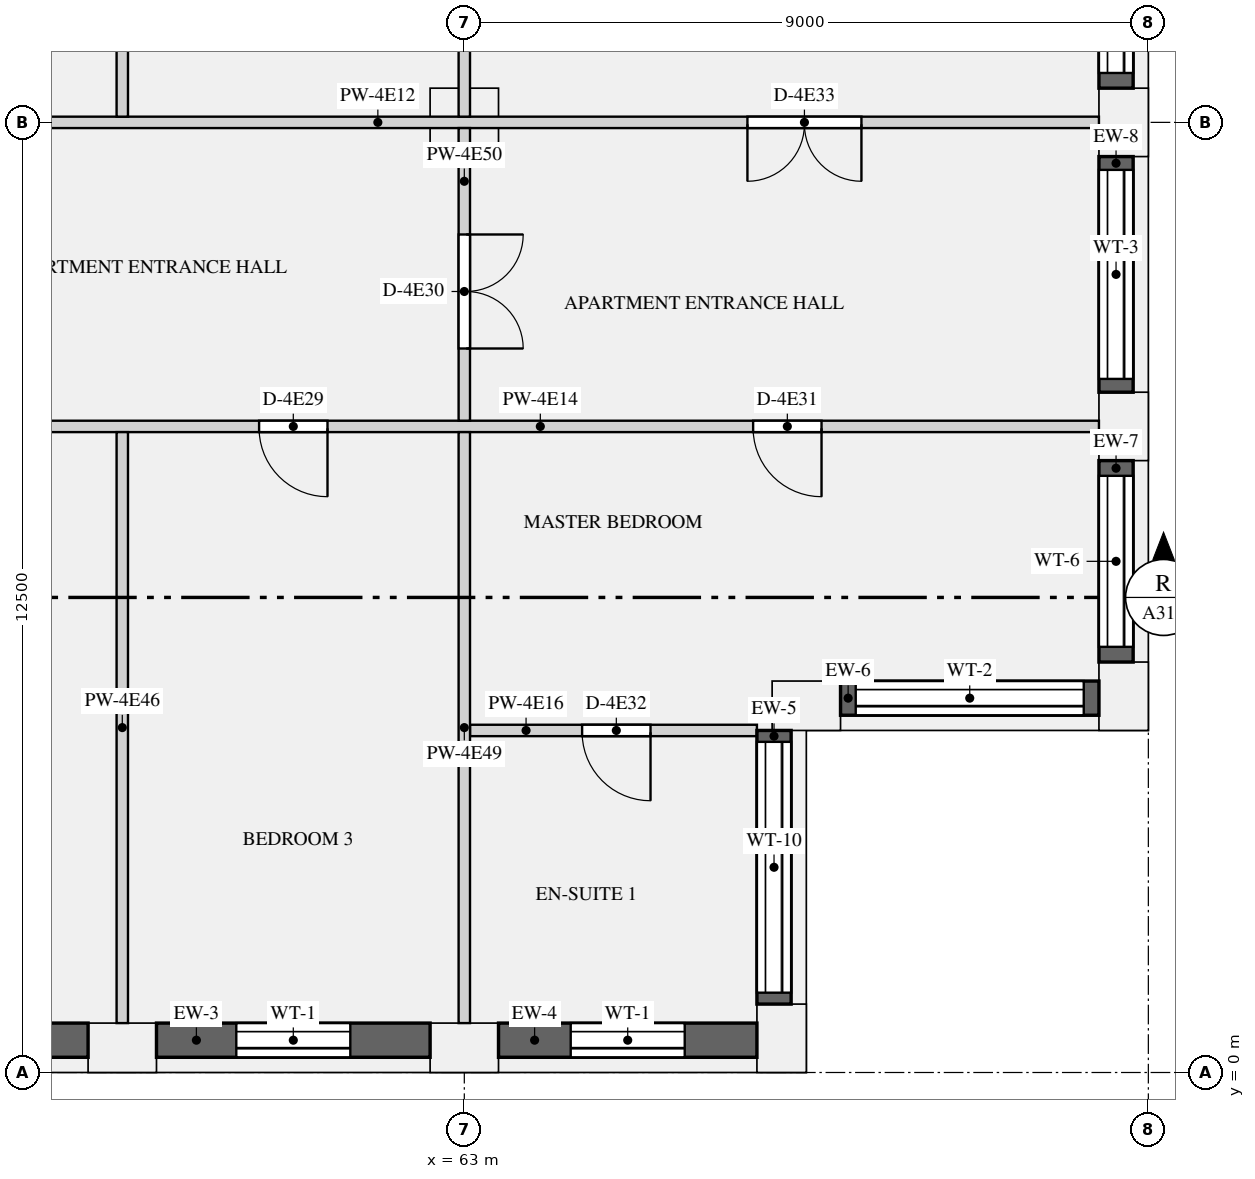
"""IFC4 building model, lengths in metres.
Left out: names, types, materials, properties, quantities, classifications, styles, units other than length and angle.
Written with IfcOpenShell. Run it as: python <this file> out.ifc"""

import sys

from ifc_helpers import new_model, si_unit, direction, frame, frame_2d, origin, origin_2d, place, context, subcontext, project, spatial, rectangle, extrude, element, fill, save


model = new_model("IFC4")
c1 = context("Model", 3, precision=1e-05, world=origin(), true_north=direction((0.0, 1.0)))
c2 = subcontext(c1, "Body", "Model", "MODEL_VIEW")
j1 = project(units=[si_unit("LENGTHUNIT", "METRE"), si_unit("PLANEANGLEUNIT", "RADIAN")], contexts=[c1])
p1 = place(None, origin())
s1 = spatial("IfcSite", under=j1, at=p1, CompositionType="ELEMENT")
p2 = place(p1, origin())
s2 = spatial("IfcBuilding", under=s1, at=p2, CompositionType="ELEMENT")
p3 = place(p2, frame((0.0, 0.0, 232.65)))
s3 = spatial("IfcBuildingStorey", under=s2, at=p3, CompositionType="ELEMENT", Elevation=232.65)
for number, where, z_axis, x_axis in (
    (1, (58.5, 0.325, 0.0), (0.0, 0.0, 1.0), (1.0, 0.0, 0.0)),
    (2, (63.0, 0.325, 0.0), (0.0, 0.0, 1.0), (1.0, 0.0, 0.0)),
    (3, (67.175, 0.45, 0.0), (0.0, 0.0, 1.0), (0.0, 1.0, 0.0)),
    (4, (67.5, 4.825, 0.0), (0.0, 0.0, 1.0), (1.0, 0.0, 0.0)),
    (5, (71.675, 4.95, 0.0), (0.0, 0.0, 1.0), (0.0, 1.0, 0.0)),
    (6, (71.675, 8.5, 0.0), (0.0, 0.0, 1.0), (0.0, 1.0, 0.0)),
    (7, (71.675, 12.5, 0.0), (0.0, 0.0, 1.0), (0.0, 1.0, 0.0)),
):
    element("IfcColumn", number, at=place(p3, frame(where, z_axis=z_axis, x_axis=x_axis)), inside=s3, PredefinedType="USERDEFINED", context=c2, shape_type="SweptSolid", body=[
        extrude(rectangle(XDim=0.9, YDim=0.65, at=origin_2d()), origin(), (0.0, 0.0, 1.0), 3.15),
    ])
p4 = place(p3, frame((63.0, 12.5, 0.0), z_axis=(0.0, 0.0, 1.0), x_axis=(1.0, 0.0, 0.0)))
e8 = element("IfcColumn", 8, at=p4, inside=s3, PredefinedType="COLUMN", context=c2, shape_type="SweptSolid", body=[
    extrude(rectangle(XDim=0.9, YDim=0.9, at=origin_2d()), origin(), (0.0, 0.0, 1.0), 3.15),
])
p5 = place(p3, frame((54.0, 0.425, 0.9), z_axis=(0.0, 0.0, 1.0), x_axis=(1.0, 0.0, 0.0)))
e9 = element("IfcWall", 9, at=p5, inside=s3, PredefinedType="SOLIDWALL", context=c2, shape_type="SweptSolid", body=[
    extrude(rectangle(XDim=4.05, YDim=0.45, at=frame_2d((2.025, 0.0))), origin(), (0.0, 0.0, 1.0), 1.9),
])
p6 = place(p5, frame((1.275, 0.0, 0.15)))
e10 = element("IfcOpeningElement", 10, at=p6, cuts=e9, PredefinedType="OPENING", context=c2, shape_type="SweptSolid", body=[
    extrude(rectangle(XDim=1.5, YDim=1.5, at=frame_2d((0.75, 0.75))), frame((0.0, 0.235, 0.0), z_axis=(0.0, -1.0, 0.0), x_axis=(1.0, 0.0, 0.0)), (0.0, 0.0, 1.0), 0.47),
])
p7 = place(p3, frame((58.95, 0.425, 0.9), z_axis=(0.0, 0.0, 1.0), x_axis=(1.0, 0.0, 0.0)))
e11 = element("IfcWall", 11, at=p7, inside=s3, PredefinedType="SOLIDWALL", context=c2, shape_type="SweptSolid", body=[
    extrude(rectangle(XDim=3.6, YDim=0.45, at=frame_2d((1.8, 0.0))), origin(), (0.0, 0.0, 1.0), 1.9),
])
p8 = place(p7, frame((1.05, 0.0, 0.15)))
e12 = element("IfcOpeningElement", 12, at=p8, cuts=e11, PredefinedType="OPENING", context=c2, shape_type="SweptSolid", body=[
    extrude(rectangle(XDim=1.5, YDim=1.5, at=frame_2d((0.75, 0.75))), frame((0.0, 0.235, 0.0), z_axis=(0.0, -1.0, 0.0), x_axis=(1.0, 0.0, 0.0)), (0.0, 0.0, 1.0), 0.47),
])
p9 = place(p3, frame((63.45, 0.425, 0.9), z_axis=(0.0, 0.0, 1.0), x_axis=(1.0, 0.0, 0.0)))
e13 = element("IfcWall", 13, at=p9, inside=s3, PredefinedType="SOLIDWALL", context=c2, shape_type="SweptSolid", body=[
    extrude(rectangle(XDim=3.4, YDim=0.45, at=frame_2d((1.7, 0.0))), origin(), (0.0, 0.0, 1.0), 1.9),
])
p10 = place(p9, frame((0.95, 0.0, 0.15)))
e14 = element("IfcOpeningElement", 14, at=p10, cuts=e13, PredefinedType="OPENING", context=c2, shape_type="SweptSolid", body=[
    extrude(rectangle(XDim=1.5, YDim=1.5, at=frame_2d((0.75, 0.75))), frame((0.0, 0.235, 0.0), z_axis=(0.0, -1.0, 0.0), x_axis=(1.0, 0.0, 0.0)), (0.0, 0.0, 1.0), 0.47),
])
p11 = place(p3, frame((67.075, 0.9, 0.9), z_axis=(0.0, 0.0, 1.0), x_axis=(0.0, 1.0, 0.0)))
e15 = element("IfcWall", 15, at=p11, inside=s3, PredefinedType="SOLIDWALL", context=c2, shape_type="SweptSolid", body=[
    extrude(rectangle(XDim=3.6, YDim=0.45, at=frame_2d((1.8, 0.0))), origin(), (0.0, 0.0, 1.0), 1.9),
])
p12 = place(p11, frame((0.15, 0.0, 0.15)))
e16 = element("IfcOpeningElement", 16, at=p12, cuts=e15, PredefinedType="OPENING", context=c2, shape_type="SweptSolid", body=[
    extrude(rectangle(XDim=3.3, YDim=1.5, at=frame_2d((1.65, 0.75))), frame((0.0, 0.235, 0.0), z_axis=(0.0, -1.0, 0.0), x_axis=(1.0, 0.0, 0.0)), (0.0, 0.0, 1.0), 0.47),
])
p13 = place(p3, frame((67.95, 4.925, 0.9), z_axis=(0.0, 0.0, 1.0), x_axis=(1.0, 0.0, 0.0)))
e17 = element("IfcWall", 17, at=p13, inside=s3, PredefinedType="SOLIDWALL", context=c2, shape_type="SweptSolid", body=[
    extrude(rectangle(XDim=3.4, YDim=0.45, at=frame_2d((1.7, 0.0))), origin(), (0.0, 0.0, 1.0), 1.9),
])
p14 = place(p13, frame((0.2, 0.0, 0.15)))
e18 = element("IfcOpeningElement", 18, at=p14, cuts=e17, PredefinedType="OPENING", context=c2, shape_type="SweptSolid", body=[
    extrude(rectangle(XDim=3.0, YDim=1.5, at=frame_2d((1.5, 0.75))), frame((0.0, 0.235, 0.0), z_axis=(0.0, -1.0, 0.0), x_axis=(1.0, 0.0, 0.0)), (0.0, 0.0, 1.0), 0.47),
])
p15 = place(p3, frame((71.575, 5.4, 0.9), z_axis=(0.0, 0.0, 1.0), x_axis=(0.0, 1.0, 0.0)))
e19 = element("IfcWall", 19, at=p15, inside=s3, PredefinedType="SOLIDWALL", context=c2, shape_type="SweptSolid", body=[
    extrude(rectangle(XDim=2.65, YDim=0.45, at=frame_2d((1.325, 0.0))), origin(), (0.0, 0.0, 1.0), 1.9),
])
p16 = place(p15, frame((0.2, 0.0, 0.15)))
e20 = element("IfcOpeningElement", 20, at=p16, cuts=e19, PredefinedType="OPENING", context=c2, shape_type="SweptSolid", body=[
    extrude(rectangle(XDim=2.25, YDim=1.5, at=frame_2d((1.125, 0.75))), frame((0.0, 0.235, 0.0), z_axis=(0.0, -1.0, 0.0), x_axis=(1.0, 0.0, 0.0)), (0.0, 0.0, 1.0), 0.47),
])
p17 = place(p3, frame((71.575, 8.95, 0.9), z_axis=(0.0, 0.0, 1.0), x_axis=(0.0, 1.0, 0.0)))
e21 = element("IfcWall", 21, at=p17, inside=s3, PredefinedType="SOLIDWALL", context=c2, shape_type="SweptSolid", body=[
    extrude(rectangle(XDim=3.1, YDim=0.45, at=frame_2d((1.55, 0.0))), origin(), (0.0, 0.0, 1.0), 1.9),
])
p18 = place(p17, frame((0.175, 0.0, 0.15)))
e22 = element("IfcOpeningElement", 22, at=p18, cuts=e21, PredefinedType="OPENING", context=c2, shape_type="SweptSolid", body=[
    extrude(rectangle(XDim=2.75, YDim=1.5, at=frame_2d((1.375, 0.75))), frame((0.0, 0.235, 0.0), z_axis=(0.0, -1.0, 0.0), x_axis=(1.0, 0.0, 0.0)), (0.0, 0.0, 1.0), 0.47),
])
p19 = place(p3, frame((71.575, 12.95, 0.9), z_axis=(0.0, 0.0, 1.0), x_axis=(0.0, 1.0, 0.0)))
e23 = element("IfcWall", 23, at=p19, inside=s3, PredefinedType="SOLIDWALL", context=c2, shape_type="SweptSolid", body=[
    extrude(rectangle(XDim=2.9, YDim=0.45, at=frame_2d((1.45, 0.0))), origin(), (0.0, 0.0, 1.0), 1.9),
])
p20 = place(p19, frame((0.2, 0.0, 0.15)))
e24 = element("IfcOpeningElement", 24, at=p20, cuts=e23, PredefinedType="OPENING", context=c2, shape_type="SweptSolid", body=[
    extrude(rectangle(XDim=2.5, YDim=1.5, at=frame_2d((1.25, 0.75))), frame((0.0, 0.235, 0.0), z_axis=(0.0, -1.0, 0.0), x_axis=(1.0, 0.0, 0.0)), (0.0, 0.0, 1.0), 0.47),
])
p21 = place(p3, frame((54.0, 12.5, 0.0), z_axis=(0.0, 0.0, 1.0), x_axis=(1.0, 0.0, 0.0)))
e25 = element("IfcWall", 25, at=p21, inside=s3, PredefinedType="PARTITIONING", context=c2, shape_type="SweptSolid", body=[
    extrude(rectangle(XDim=17.35, YDim=0.15, at=frame_2d((8.675, 0.0))), origin(), (0.0, 0.0, 1.0), 2.8),
])
p22 = place(p21, frame((1.5, 0.0, 0.0)))
e26 = element("IfcOpeningElement", 26, at=p22, cuts=e25, PredefinedType="OPENING", context=c2, shape_type="SweptSolid", body=[
    extrude(rectangle(XDim=1.5, YDim=2.1, at=frame_2d((0.75, 1.05))), frame((0.0, 0.085, 0.0), z_axis=(0.0, -1.0, 0.0), x_axis=(1.0, 0.0, 0.0)), (0.0, 0.0, 1.0), 0.17),
])
p23 = place(p21, frame((12.725, 0.0, 0.0)))
e27 = element("IfcOpeningElement", 27, at=p23, cuts=e25, PredefinedType="OPENING", context=c2, shape_type="SweptSolid", body=[
    extrude(rectangle(XDim=1.5, YDim=2.1, at=frame_2d((0.75, 1.05))), frame((0.0, 0.085, 0.0), z_axis=(0.0, -1.0, 0.0), x_axis=(1.0, 0.0, 0.0)), (0.0, 0.0, 1.0), 0.17),
])
p24 = place(p3, frame((54.0, 8.5, 0.0), z_axis=(0.0, 0.0, 1.0), x_axis=(1.0, 0.0, 0.0)))
e28 = element("IfcWall", 28, at=p24, inside=s3, PredefinedType="PARTITIONING", context=c2, shape_type="SweptSolid", body=[
    extrude(rectangle(XDim=17.35, YDim=0.15, at=frame_2d((8.675, 0.0))), origin(), (0.0, 0.0, 1.0), 2.8),
])
p25 = place(p24, frame((1.8, 0.0, 0.0)))
e29 = element("IfcOpeningElement", 29, at=p25, cuts=e28, PredefinedType="OPENING", context=c2, shape_type="SweptSolid", body=[
    extrude(rectangle(XDim=0.9, YDim=2.1, at=frame_2d((0.45, 1.05))), frame((0.0, 0.085, 0.0), z_axis=(0.0, -1.0, 0.0), x_axis=(1.0, 0.0, 0.0)), (0.0, 0.0, 1.0), 0.17),
])
p26 = place(p24, frame((6.3, 0.0, 0.0)))
e30 = element("IfcOpeningElement", 30, at=p26, cuts=e28, PredefinedType="OPENING", context=c2, shape_type="SweptSolid", body=[
    extrude(rectangle(XDim=0.9, YDim=2.1, at=frame_2d((0.45, 1.05))), frame((0.0, 0.085, 0.0), z_axis=(0.0, -1.0, 0.0), x_axis=(1.0, 0.0, 0.0)), (0.0, 0.0, 1.0), 0.17),
])
p27 = place(p24, frame((12.8, 0.0, 0.0)))
e31 = element("IfcOpeningElement", 31, at=p27, cuts=e28, PredefinedType="OPENING", context=c2, shape_type="SweptSolid", body=[
    extrude(rectangle(XDim=0.9, YDim=2.1, at=frame_2d((0.45, 1.05))), frame((0.0, 0.085, 0.0), z_axis=(0.0, -1.0, 0.0), x_axis=(1.0, 0.0, 0.0)), (0.0, 0.0, 1.0), 0.17),
])
p28 = place(p3, frame((63.075, 4.5, 0.0), z_axis=(0.0, 0.0, 1.0), x_axis=(1.0, 0.0, 0.0)))
e32 = element("IfcWall", 32, at=p28, inside=s3, PredefinedType="PARTITIONING", context=c2, shape_type="SweptSolid", body=[
    extrude(rectangle(XDim=3.775, YDim=0.15, at=frame_2d((1.888, 0.0))), origin(), (0.0, 0.0, 1.0), 2.8),
])
p29 = place(p28, frame((1.475, 0.0, 0.0)))
e33 = element("IfcOpeningElement", 33, at=p29, cuts=e32, PredefinedType="OPENING", context=c2, shape_type="SweptSolid", body=[
    extrude(rectangle(XDim=0.9, YDim=2.1, at=frame_2d((0.45, 1.05))), frame((0.0, 0.085, 0.0), z_axis=(0.0, -1.0, 0.0), x_axis=(1.0, 0.0, 0.0)), (0.0, 0.0, 1.0), 0.17),
])
p30 = place(p3, frame((58.5, 0.65, 0.0), z_axis=(0.0, 0.0, 1.0), x_axis=(0.0, 1.0, 0.0)))
e34 = element("IfcWall", 34, at=p30, inside=s3, PredefinedType="PARTITIONING", context=c2, shape_type="SweptSolid", body=[
    extrude(rectangle(XDim=7.775, YDim=0.15, at=frame_2d((3.888, 0.0))), origin(), (0.0, 0.0, 1.0), 2.8),
])
p31 = place(p3, frame((58.5, 12.575, 0.0), z_axis=(0.0, 0.0, 1.0), x_axis=(0.0, 1.0, 0.0)))
e35 = element("IfcWall", 35, at=p31, inside=s3, PredefinedType="PARTITIONING", context=c2, shape_type="SweptSolid", body=[
    extrude(rectangle(XDim=10.325, YDim=0.15, at=frame_2d((5.163, 0.0))), origin(), (0.0, 0.0, 1.0), 2.8),
])
p32 = place(p31, frame((1.475, 0.0, 0.0)))
e36 = element("IfcOpeningElement", 36, at=p32, cuts=e35, PredefinedType="OPENING", context=c2, shape_type="SweptSolid", body=[
    extrude(rectangle(XDim=0.9, YDim=2.1, at=frame_2d((0.45, 1.05))), frame((0.0, 0.085, 0.0), z_axis=(0.0, -1.0, 0.0), x_axis=(1.0, 0.0, 0.0)), (0.0, 0.0, 1.0), 0.17),
])
p33 = place(p31, frame((4.725, 0.0, 0.0)))
e37 = element("IfcOpeningElement", 37, at=p33, cuts=e35, PredefinedType="OPENING", context=c2, shape_type="SweptSolid", body=[
    extrude(rectangle(XDim=0.9, YDim=2.1, at=frame_2d((0.45, 1.05))), frame((0.0, 0.085, 0.0), z_axis=(0.0, -1.0, 0.0), x_axis=(1.0, 0.0, 0.0)), (0.0, 0.0, 1.0), 0.17),
])
p34 = place(p31, frame((8.0, 0.0, 0.0)))
e38 = element("IfcOpeningElement", 38, at=p34, cuts=e35, PredefinedType="OPENING", context=c2, shape_type="SweptSolid", body=[
    extrude(rectangle(XDim=0.9, YDim=2.1, at=frame_2d((0.45, 1.05))), frame((0.0, 0.085, 0.0), z_axis=(0.0, -1.0, 0.0), x_axis=(1.0, 0.0, 0.0)), (0.0, 0.0, 1.0), 0.17),
])
p35 = place(p3, frame((63.0, 0.65, 0.0), z_axis=(0.0, 0.0, 1.0), x_axis=(0.0, 1.0, 0.0)))
e39 = element("IfcWall", 39, at=p35, inside=s3, PredefinedType="PARTITIONING", context=c2, shape_type="SweptSolid", body=[
    extrude(rectangle(XDim=7.775, YDim=0.15, at=frame_2d((3.888, 0.0))), origin(), (0.0, 0.0, 1.0), 2.8),
])
p36 = place(p3, frame((63.0, 8.575, 0.0), z_axis=(0.0, 0.0, 1.0), x_axis=(0.0, 1.0, 0.0)))
e40 = element("IfcWall", 40, at=p36, inside=s3, PredefinedType="PARTITIONING", context=c2, shape_type="SweptSolid", body=[
    extrude(rectangle(XDim=3.85, YDim=0.15, at=frame_2d((1.925, 0.0))), origin(), (0.0, 0.0, 1.0), 2.8),
])
p37 = place(p36, frame((0.95, 0.0, 0.0)))
e41 = element("IfcOpeningElement", 41, at=p37, cuts=e40, PredefinedType="OPENING", context=c2, shape_type="SweptSolid", body=[
    extrude(rectangle(XDim=1.5, YDim=2.1, at=frame_2d((0.75, 1.05))), frame((0.0, 0.085, 0.0), z_axis=(0.0, -1.0, 0.0), x_axis=(1.0, 0.0, 0.0)), (0.0, 0.0, 1.0), 0.17),
])
p38 = place(p3, frame((63.0, 12.575, 0.0), z_axis=(0.0, 0.0, 1.0), x_axis=(0.0, 1.0, 0.0)))
e42 = element("IfcWall", 42, at=p38, inside=s3, PredefinedType="PARTITIONING", context=c2, shape_type="SweptSolid", body=[
    extrude(rectangle(XDim=11.85, YDim=0.15, at=frame_2d((5.925, 0.0))), origin(), (0.0, 0.0, 1.0), 2.8),
])
p39 = place(p38, frame((8.25, 0.0, 0.0)))
e43 = element("IfcOpeningElement", 43, at=p39, cuts=e42, PredefinedType="OPENING", context=c2, shape_type="SweptSolid", body=[
    extrude(rectangle(XDim=0.9, YDim=2.1, at=frame_2d((0.45, 1.05))), frame((0.0, 0.085, 0.0), z_axis=(0.0, -1.0, 0.0), x_axis=(1.0, 0.0, 0.0)), (0.0, 0.0, 1.0), 0.17),
])
p40 = place(p8, origin())
e44 = element("IfcWindow", 44, at=p40, inside=s3, PartitioningType="SINGLE_PANEL", PredefinedType="WINDOW", context=c2, shape_type="SweptSolid", body=[
    extrude(rectangle(XDim=1.5, YDim=1.5, at=frame_2d((0.75, 0.75))), frame((0.0, -0.065, 0.0), z_axis=(0.0, -1.0, 0.0), x_axis=(1.0, 0.0, 0.0)), (0.0, 0.0, 1.0), 0.06),
])
fill(e12, e44)
p41 = place(p10, origin())
e45 = element("IfcWindow", 45, at=p41, inside=s3, PartitioningType="SINGLE_PANEL", PredefinedType="WINDOW", context=c2, shape_type="SweptSolid", body=[
    extrude(rectangle(XDim=1.5, YDim=1.5, at=frame_2d((0.75, 0.75))), frame((0.0, -0.065, 0.0), z_axis=(0.0, -1.0, 0.0), x_axis=(1.0, 0.0, 0.0)), (0.0, 0.0, 1.0), 0.06),
])
fill(e14, e45)
p42 = place(p12, origin())
e46 = element("IfcWindow", 46, at=p42, inside=s3, PartitioningType="SINGLE_PANEL", PredefinedType="WINDOW", context=c2, shape_type="SweptSolid", body=[
    extrude(rectangle(XDim=3.3, YDim=1.5, at=frame_2d((1.65, 0.75))), frame((0.0, -0.065, 0.0), z_axis=(0.0, -1.0, 0.0), x_axis=(1.0, 0.0, 0.0)), (0.0, 0.0, 1.0), 0.06),
])
fill(e16, e46)
p43 = place(p14, origin())
e47 = element("IfcWindow", 47, at=p43, inside=s3, PartitioningType="SINGLE_PANEL", PredefinedType="WINDOW", context=c2, shape_type="SweptSolid", body=[
    extrude(rectangle(XDim=3.0, YDim=1.5, at=frame_2d((1.5, 0.75))), frame((0.0, -0.065, 0.0), z_axis=(0.0, -1.0, 0.0), x_axis=(1.0, 0.0, 0.0)), (0.0, 0.0, 1.0), 0.06),
])
fill(e18, e47)
p44 = place(p16, origin())
e48 = element("IfcWindow", 48, at=p44, inside=s3, PartitioningType="SINGLE_PANEL", PredefinedType="WINDOW", context=c2, shape_type="SweptSolid", body=[
    extrude(rectangle(XDim=2.25, YDim=1.5, at=frame_2d((1.125, 0.75))), frame((0.0, -0.065, 0.0), z_axis=(0.0, -1.0, 0.0), x_axis=(1.0, 0.0, 0.0)), (0.0, 0.0, 1.0), 0.06),
])
fill(e20, e48)
p45 = place(p18, origin())
e49 = element("IfcWindow", 49, at=p45, inside=s3, PartitioningType="SINGLE_PANEL", PredefinedType="WINDOW", context=c2, shape_type="SweptSolid", body=[
    extrude(rectangle(XDim=2.75, YDim=1.5, at=frame_2d((1.375, 0.75))), frame((0.0, -0.065, 0.0), z_axis=(0.0, -1.0, 0.0), x_axis=(1.0, 0.0, 0.0)), (0.0, 0.0, 1.0), 0.06),
])
fill(e22, e49)
p46 = place(p20, origin())
e50 = element("IfcWindow", 50, at=p46, inside=s3, PartitioningType="SINGLE_PANEL", PredefinedType="WINDOW", context=c2, shape_type="SweptSolid", body=[
    extrude(rectangle(XDim=2.5, YDim=1.5, at=frame_2d((1.25, 0.75))), frame((0.0, -0.065, 0.0), z_axis=(0.0, -1.0, 0.0), x_axis=(1.0, 0.0, 0.0)), (0.0, 0.0, 1.0), 0.06),
])
fill(e24, e50)
p47 = place(p26, frame((0.9, 0.0, 0.0), z_axis=(0.0, 0.0, 1.0), x_axis=(-1.0, 0.0, 0.0)))
e51 = element("IfcDoor", 51, at=p47, inside=s3, OperationType="SINGLE_SWING_LEFT", PredefinedType="DOOR", context=c2, shape_type="SweptSolid", body=[
    extrude(rectangle(XDim=0.9, YDim=2.1, at=frame_2d((0.45, 1.05))), frame((0.0, 0.025, 0.0), z_axis=(0.0, -1.0, 0.0), x_axis=(1.0, 0.0, 0.0)), (0.0, 0.0, 1.0), 0.05),
])
fill(e30, e51)
p48 = place(p37, frame((1.5, 0.0, 0.0), z_axis=(0.0, 0.0, 1.0), x_axis=(-1.0, 0.0, 0.0)))
e52 = element("IfcDoor", 52, at=p48, inside=s3, OperationType="DOUBLE_DOOR_SINGLE_SWING", PredefinedType="DOOR", context=c2, shape_type="SweptSolid", body=[
    extrude(rectangle(XDim=1.5, YDim=2.1, at=frame_2d((0.75, 1.05))), frame((0.0, 0.025, 0.0), z_axis=(0.0, -1.0, 0.0), x_axis=(1.0, 0.0, 0.0)), (0.0, 0.0, 1.0), 0.05),
])
fill(e41, e52)
p49 = place(p27, frame((0.9, 0.0, 0.0), z_axis=(0.0, 0.0, 1.0), x_axis=(-1.0, 0.0, 0.0)))
e53 = element("IfcDoor", 53, at=p49, inside=s3, OperationType="SINGLE_SWING_LEFT", PredefinedType="DOOR", context=c2, shape_type="SweptSolid", body=[
    extrude(rectangle(XDim=0.9, YDim=2.1, at=frame_2d((0.45, 1.05))), frame((0.0, 0.025, 0.0), z_axis=(0.0, -1.0, 0.0), x_axis=(1.0, 0.0, 0.0)), (0.0, 0.0, 1.0), 0.05),
])
fill(e31, e53)
p50 = place(p29, frame((0.9, 0.0, 0.0), z_axis=(0.0, 0.0, 1.0), x_axis=(-1.0, 0.0, 0.0)))
e54 = element("IfcDoor", 54, at=p50, inside=s3, OperationType="SINGLE_SWING_LEFT", PredefinedType="DOOR", context=c2, shape_type="SweptSolid", body=[
    extrude(rectangle(XDim=0.9, YDim=2.1, at=frame_2d((0.45, 1.05))), frame((0.0, 0.025, 0.0), z_axis=(0.0, -1.0, 0.0), x_axis=(1.0, 0.0, 0.0)), (0.0, 0.0, 1.0), 0.05),
])
fill(e33, e54)
p51 = place(p23, frame((1.5, 0.0, 0.0), z_axis=(0.0, 0.0, 1.0), x_axis=(-1.0, 0.0, 0.0)))
e55 = element("IfcDoor", 55, at=p51, inside=s3, OperationType="DOUBLE_DOOR_SINGLE_SWING", PredefinedType="DOOR", context=c2, shape_type="SweptSolid", body=[
    extrude(rectangle(XDim=1.5, YDim=2.1, at=frame_2d((0.75, 1.05))), frame((0.0, 0.025, 0.0), z_axis=(0.0, -1.0, 0.0), x_axis=(1.0, 0.0, 0.0)), (0.0, 0.0, 1.0), 0.05),
])
fill(e27, e55)
save(model, sys.argv[1])
